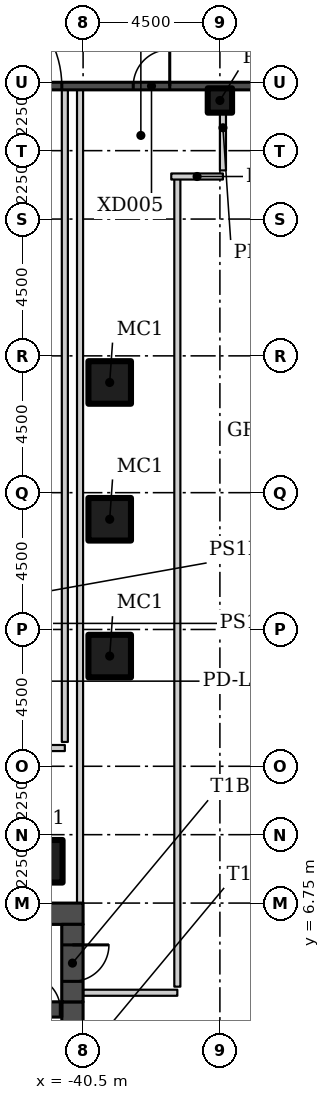
"""IFC4 building model, lengths in metres.
Left out: names, types, materials, properties, quantities, classifications, styles, units other than length and angle.
Written with IfcOpenShell. Run it as: python <this file> out.ifc"""

import sys

from ifc_helpers import new_model, si_unit, direction, frame, frame_2d, origin, origin_2d, place, context, subcontext, project, spatial, rectangle, hollow_rectangle, extrude, element, fill, save


model = new_model("IFC4")
c1 = context("Model", 3, precision=1e-05, world=origin(), true_north=direction((0.0, 1.0)))
c2 = subcontext(c1, "Body", "Model", "MODEL_VIEW")
j1 = project(units=[si_unit("LENGTHUNIT", "METRE"), si_unit("PLANEANGLEUNIT", "RADIAN")], contexts=[c1])
p1 = place(None, origin())
s1 = spatial("IfcSite", under=j1, at=p1, CompositionType="ELEMENT")
p2 = place(p1, origin())
s2 = spatial("IfcBuilding", under=s1, at=p2, CompositionType="ELEMENT")
p3 = place(p2, origin())
s3 = spatial("IfcBuildingStorey", under=s2, at=p3, CompositionType="ELEMENT", Elevation=0.0)
for number, where in (
    (1, (-41.875, 8.125, 0.0)),
    (2, (-39.625, 14.875, 0.0)),
    (3, (-39.625, 19.375, 0.0)),
    (4, (-39.625, 23.875, 0.0)),
):
    element("IfcColumn", number, at=place(p3, frame(where)), inside=s3, PredefinedType="COLUMN", context=c2, shape_type="SweptSolid", body=[
        extrude(hollow_rectangle(XDim=1.4, YDim=1.4, WallThickness=0.06, at=origin_2d()), origin(), (0.0, 0.0, 1.0), 6.1),
    ])
p4 = place(p3, frame((-36.0, 33.15, 0.0)))
e5 = element("IfcColumn", 5, at=p4, inside=s3, PredefinedType="COLUMN", context=c2, shape_type="SweptSolid", body=[
    extrude(hollow_rectangle(XDim=0.8, YDim=0.8, WallThickness=0.03, at=origin_2d()), origin(), (0.0, 0.0, 1.0), 6.1),
])
p5 = place(p3, frame((-37.4, 4.0, 0.0), z_axis=(0.0, 0.0, 1.0), x_axis=(0.0, 1.0, 0.0)))
e6 = element("IfcWall", 6, at=p5, inside=s3, PredefinedType="PARTITIONING", context=c2, shape_type="SweptSolid", body=[
    extrude(rectangle(XDim=26.649, YDim=0.2, at=frame_2d((13.325, 0.0))), origin(), (0.0, 0.0, 1.0), 6.1),
])
p6 = place(p3, frame((-35.9, 30.85, 0.0), z_axis=(0.0, 0.0, 1.0), x_axis=(0.0, 1.0, 0.0)))
e7 = element("IfcWall", 7, at=p6, inside=s3, PredefinedType="PARTITIONING", context=c2, shape_type="SweptSolid", body=[
    extrude(rectangle(XDim=2.805, YDim=0.2, at=frame_2d((1.402, 0.0))), origin(), (0.0, 0.0, 1.0), 6.1),
])
p7 = place(p3, frame((-40.6, 33.655, 0.0), z_axis=(0.0, 0.0, 1.0), x_axis=(0.0, -1.0, 0.0)))
e8 = element("IfcWall", 8, at=p7, inside=s3, PredefinedType="PARTITIONING", context=c2, shape_type="SweptSolid", body=[
    extrude(rectangle(XDim=26.905, YDim=0.2, at=frame_2d((13.453, 0.0))), origin(), (0.0, 0.0, 1.0), 6.1),
])
p8 = place(p3, frame((-37.6, 30.65, 0.0)))
e9 = element("IfcWall", 9, at=p8, inside=s3, PredefinedType="PARTITIONING", context=c2, shape_type="SweptSolid", body=[
    extrude(rectangle(XDim=1.7, YDim=0.2, at=frame_2d((0.85, 0.0))), origin(), (0.0, 0.0, 1.0), 6.1),
])
p9 = place(p3, frame((-40.5, 3.8, 0.0)))
e10 = element("IfcWall", 10, at=p9, inside=s3, PredefinedType="PARTITIONING", context=c2, shape_type="SweptSolid", body=[
    extrude(rectangle(XDim=3.1, YDim=0.2, at=frame_2d((1.55, 0.0))), origin(), (0.0, 0.0, 1.0), 6.1),
])
p10 = place(p3, frame((-44.6, 11.85, 0.0)))
e11 = element("IfcWall", 11, at=p10, inside=s3, PredefinedType="PARTITIONING", context=c2, shape_type="SweptSolid", body=[
    extrude(rectangle(XDim=3.5, YDim=0.2, at=frame_2d((1.75, 0.0))), origin(), (0.0, 0.0, 1.0), 6.1),
])
p11 = place(p3, frame((-41.1, 12.05, 0.0), z_axis=(0.0, 0.0, 1.0), x_axis=(0.0, 1.0, 0.0)))
e12 = element("IfcWall", 12, at=p11, inside=s3, PredefinedType="PARTITIONING", context=c2, shape_type="SweptSolid", body=[
    extrude(rectangle(XDim=21.605, YDim=0.2, at=frame_2d((10.802, 0.0))), origin(), (0.0, 0.0, 1.0), 6.1),
])
p12 = place(p3, frame((-67.5, 33.625, 0.0)))
e13 = element("IfcWall", 13, at=p12, inside=s3, PredefinedType="SOLIDWALL", context=c2, shape_type="SweptSolid", body=[
    extrude(rectangle(XDim=130.5, YDim=0.25, at=frame_2d((65.25, 0.0))), origin(), (0.0, 0.0, 1.0), 6.15),
])
p13 = place(p12, frame((28.65, 0.0, 0.0)))
e14 = element("IfcOpeningElement", 14, at=p13, cuts=e13, PredefinedType="OPENING", context=c2, shape_type="SweptSolid", body=[
    extrude(rectangle(XDim=1.2, YDim=2.4, at=frame_2d((0.6, 1.2))), frame((0.0, 0.135, 0.0), z_axis=(0.0, -1.0, 0.0), x_axis=(1.0, 0.0, 0.0)), (0.0, 0.0, 1.0), 0.27),
])
p14 = place(p12, frame((37.25, 0.0, 0.0)))
e15 = element("IfcOpeningElement", 15, at=p14, cuts=e13, PredefinedType="OPENING", context=c2, shape_type="SweptSolid", body=[
    extrude(rectangle(XDim=2.0, YDim=2.4, at=frame_2d((1.0, 1.2))), frame((0.0, 0.135, 0.0), z_axis=(0.0, -1.0, 0.0), x_axis=(1.0, 0.0, 0.0)), (0.0, 0.0, 1.0), 0.27),
])
p15 = place(p12, frame((100.25, 0.0, 0.0)))
e16 = element("IfcOpeningElement", 16, at=p15, cuts=e13, PredefinedType="OPENING", context=c2, shape_type="SweptSolid", body=[
    extrude(rectangle(XDim=2.0, YDim=2.4, at=frame_2d((1.0, 1.2))), frame((0.0, 0.135, 0.0), z_axis=(0.0, -1.0, 0.0), x_axis=(1.0, 0.0, 0.0)), (0.0, 0.0, 1.0), 0.27),
])
p16 = place(p12, frame((55.25, 0.0, 0.0)))
e17 = element("IfcOpeningElement", 17, at=p16, cuts=e13, PredefinedType="OPENING", context=c2, shape_type="SweptSolid", body=[
    extrude(rectangle(XDim=2.0, YDim=2.4, at=frame_2d((1.0, 1.2))), frame((0.0, 0.135, 0.0), z_axis=(0.0, -1.0, 0.0), x_axis=(1.0, 0.0, 0.0)), (0.0, 0.0, 1.0), 0.27),
])
p17 = place(p12, frame((68.75, 0.0, 0.0)))
e18 = element("IfcOpeningElement", 18, at=p17, cuts=e13, PredefinedType="OPENING", context=c2, shape_type="SweptSolid", body=[
    extrude(rectangle(XDim=2.0, YDim=2.4, at=frame_2d((1.0, 1.2))), frame((0.0, 0.135, 0.0), z_axis=(0.0, -1.0, 0.0), x_axis=(1.0, 0.0, 0.0)), (0.0, 0.0, 1.0), 0.27),
])
p18 = place(p12, frame((10.25, 0.0, 0.0)))
e19 = element("IfcOpeningElement", 19, at=p18, cuts=e13, PredefinedType="OPENING", context=c2, shape_type="SweptSolid", body=[
    extrude(rectangle(XDim=2.0, YDim=2.4, at=frame_2d((1.0, 1.2))), frame((0.0, 0.135, 0.0), z_axis=(0.0, -1.0, 0.0), x_axis=(1.0, 0.0, 0.0)), (0.0, 0.0, 1.0), 0.27),
])
p19 = place(p12, frame((5.65, 0.0, 0.0)))
e20 = element("IfcOpeningElement", 20, at=p19, cuts=e13, PredefinedType="OPENING", context=c2, shape_type="SweptSolid", body=[
    extrude(rectangle(XDim=2.2, YDim=2.4, at=frame_2d((1.1, 1.2))), frame((0.0, 0.135, 0.0), z_axis=(0.0, -1.0, 0.0), x_axis=(1.0, 0.0, 0.0)), (0.0, 0.0, 1.0), 0.27),
])
p20 = place(p12, frame((113.65, 0.0, 0.0)))
e21 = element("IfcOpeningElement", 21, at=p20, cuts=e13, PredefinedType="OPENING", context=c2, shape_type="SweptSolid", body=[
    extrude(rectangle(XDim=2.2, YDim=2.4, at=frame_2d((1.1, 1.2))), frame((0.0, 0.135, 0.0), z_axis=(0.0, -1.0, 0.0), x_axis=(1.0, 0.0, 0.0)), (0.0, 0.0, 1.0), 0.27),
])
p21 = place(p12, frame((45.45, 0.0, 0.0)))
e22 = element("IfcOpeningElement", 22, at=p21, cuts=e13, PredefinedType="OPENING", context=c2, shape_type="SweptSolid", body=[
    extrude(rectangle(XDim=3.6, YDim=4.5, at=frame_2d((1.8, 2.25))), frame((0.0, 0.135, 0.0), z_axis=(0.0, -1.0, 0.0), x_axis=(1.0, 0.0, 0.0)), (0.0, 0.0, 1.0), 0.27),
])
p22 = place(p12, frame((91.15, 0.0, 0.0)))
e23 = element("IfcOpeningElement", 23, at=p22, cuts=e13, PredefinedType="OPENING", context=c2, shape_type="SweptSolid", body=[
    extrude(rectangle(XDim=2.2, YDim=2.4, at=frame_2d((1.1, 1.2))), frame((0.0, 0.135, 0.0), z_axis=(0.0, -1.0, 0.0), x_axis=(1.0, 0.0, 0.0)), (0.0, 0.0, 1.0), 0.27),
])
p23 = place(p12, frame((23.0, 0.0, 0.0)))
e24 = element("IfcOpeningElement", 24, at=p23, cuts=e13, PredefinedType="OPENING", context=c2, shape_type="SweptSolid", body=[
    extrude(rectangle(XDim=3.3, YDim=2.4, at=frame_2d((1.65, 1.2))), frame((0.0, 0.135, 0.0), z_axis=(0.0, -1.0, 0.0), x_axis=(1.0, 0.0, 0.0)), (0.0, 0.0, 1.0), 0.27),
])
p24 = place(p12, frame((59.0, 0.0, 0.0)))
e25 = element("IfcOpeningElement", 25, at=p24, cuts=e13, PredefinedType="OPENING", context=c2, shape_type="SweptSolid", body=[
    extrude(rectangle(XDim=3.3, YDim=2.4, at=frame_2d((1.65, 1.2))), frame((0.0, 0.135, 0.0), z_axis=(0.0, -1.0, 0.0), x_axis=(1.0, 0.0, 0.0)), (0.0, 0.0, 1.0), 0.27),
])
p25 = place(p12, frame((86.0, 0.0, 0.0)))
e26 = element("IfcOpeningElement", 26, at=p25, cuts=e13, PredefinedType="OPENING", context=c2, shape_type="SweptSolid", body=[
    extrude(rectangle(XDim=3.3, YDim=2.4, at=frame_2d((1.65, 1.2))), frame((0.0, 0.135, 0.0), z_axis=(0.0, -1.0, 0.0), x_axis=(1.0, 0.0, 0.0)), (0.0, 0.0, 1.0), 0.27),
])
p26 = place(p12, frame((122.0, 0.0, 0.0)))
e27 = element("IfcOpeningElement", 27, at=p26, cuts=e13, PredefinedType="OPENING", context=c2, shape_type="SweptSolid", body=[
    extrude(rectangle(XDim=3.3, YDim=2.4, at=frame_2d((1.65, 1.2))), frame((0.0, 0.135, 0.0), z_axis=(0.0, -1.0, 0.0), x_axis=(1.0, 0.0, 0.0)), (0.0, 0.0, 1.0), 0.27),
])
p27 = place(p12, frame((127.05, 0.0, 3.0)))
e28 = element("IfcOpeningElement", 28, at=p27, cuts=e13, PredefinedType="OPENING", context=c2, shape_type="SweptSolid", body=[
    extrude(rectangle(XDim=2.4, YDim=1.2, at=frame_2d((1.2, 0.6))), frame((0.0, 0.135, 0.0), z_axis=(0.0, -1.0, 0.0), x_axis=(1.0, 0.0, 0.0)), (0.0, 0.0, 1.0), 0.27),
])
p28 = place(p12, frame((118.05, 0.0, 3.0)))
e29 = element("IfcOpeningElement", 29, at=p28, cuts=e13, PredefinedType="OPENING", context=c2, shape_type="SweptSolid", body=[
    extrude(rectangle(XDim=2.4, YDim=1.2, at=frame_2d((1.2, 0.6))), frame((0.0, 0.135, 0.0), z_axis=(0.0, -1.0, 0.0), x_axis=(1.0, 0.0, 0.0)), (0.0, 0.0, 1.0), 0.27),
])
p29 = place(p12, frame((109.05, 0.0, 3.0)))
e30 = element("IfcOpeningElement", 30, at=p29, cuts=e13, PredefinedType="OPENING", context=c2, shape_type="SweptSolid", body=[
    extrude(rectangle(XDim=2.4, YDim=1.2, at=frame_2d((1.2, 0.6))), frame((0.0, 0.135, 0.0), z_axis=(0.0, -1.0, 0.0), x_axis=(1.0, 0.0, 0.0)), (0.0, 0.0, 1.0), 0.27),
])
p30 = place(p12, frame((104.55, 0.0, 3.0)))
e31 = element("IfcOpeningElement", 31, at=p30, cuts=e13, PredefinedType="OPENING", context=c2, shape_type="SweptSolid", body=[
    extrude(rectangle(XDim=2.4, YDim=1.2, at=frame_2d((1.2, 0.6))), frame((0.0, 0.135, 0.0), z_axis=(0.0, -1.0, 0.0), x_axis=(1.0, 0.0, 0.0)), (0.0, 0.0, 1.0), 0.27),
])
p31 = place(p12, frame((95.55, 0.0, 3.0)))
e32 = element("IfcOpeningElement", 32, at=p31, cuts=e13, PredefinedType="OPENING", context=c2, shape_type="SweptSolid", body=[
    extrude(rectangle(XDim=2.4, YDim=1.2, at=frame_2d((1.2, 0.6))), frame((0.0, 0.135, 0.0), z_axis=(0.0, -1.0, 0.0), x_axis=(1.0, 0.0, 0.0)), (0.0, 0.0, 1.0), 0.27),
])
p32 = place(p12, frame((82.05, 0.0, 3.0)))
e33 = element("IfcOpeningElement", 33, at=p32, cuts=e13, PredefinedType="OPENING", context=c2, shape_type="SweptSolid", body=[
    extrude(rectangle(XDim=2.4, YDim=1.2, at=frame_2d((1.2, 0.6))), frame((0.0, 0.135, 0.0), z_axis=(0.0, -1.0, 0.0), x_axis=(1.0, 0.0, 0.0)), (0.0, 0.0, 1.0), 0.27),
])
p33 = place(p12, frame((77.55, 0.0, 3.0)))
e34 = element("IfcOpeningElement", 34, at=p33, cuts=e13, PredefinedType="OPENING", context=c2, shape_type="SweptSolid", body=[
    extrude(rectangle(XDim=2.4, YDim=1.2, at=frame_2d((1.2, 0.6))), frame((0.0, 0.135, 0.0), z_axis=(0.0, -1.0, 0.0), x_axis=(1.0, 0.0, 0.0)), (0.0, 0.0, 1.0), 0.27),
])
p34 = place(p12, frame((73.05, 0.0, 3.0)))
e35 = element("IfcOpeningElement", 35, at=p34, cuts=e13, PredefinedType="OPENING", context=c2, shape_type="SweptSolid", body=[
    extrude(rectangle(XDim=2.4, YDim=1.2, at=frame_2d((1.2, 0.6))), frame((0.0, 0.135, 0.0), z_axis=(0.0, -1.0, 0.0), x_axis=(1.0, 0.0, 0.0)), (0.0, 0.0, 1.0), 0.27),
])
p35 = place(p12, frame((64.05, 0.0, 3.0)))
e36 = element("IfcOpeningElement", 36, at=p35, cuts=e13, PredefinedType="OPENING", context=c2, shape_type="SweptSolid", body=[
    extrude(rectangle(XDim=2.4, YDim=1.2, at=frame_2d((1.2, 0.6))), frame((0.0, 0.135, 0.0), z_axis=(0.0, -1.0, 0.0), x_axis=(1.0, 0.0, 0.0)), (0.0, 0.0, 1.0), 0.27),
])
p36 = place(p12, frame((50.55, 0.0, 3.0)))
e37 = element("IfcOpeningElement", 37, at=p36, cuts=e13, PredefinedType="OPENING", context=c2, shape_type="SweptSolid", body=[
    extrude(rectangle(XDim=2.4, YDim=1.2, at=frame_2d((1.2, 0.6))), frame((0.0, 0.135, 0.0), z_axis=(0.0, -1.0, 0.0), x_axis=(1.0, 0.0, 0.0)), (0.0, 0.0, 1.0), 0.27),
])
p37 = place(p12, frame((41.55, 0.0, 3.0)))
e38 = element("IfcOpeningElement", 38, at=p37, cuts=e13, PredefinedType="OPENING", context=c2, shape_type="SweptSolid", body=[
    extrude(rectangle(XDim=2.4, YDim=1.2, at=frame_2d((1.2, 0.6))), frame((0.0, 0.135, 0.0), z_axis=(0.0, -1.0, 0.0), x_axis=(1.0, 0.0, 0.0)), (0.0, 0.0, 1.0), 0.27),
])
p38 = place(p12, frame((32.55, 0.0, 3.0)))
e39 = element("IfcOpeningElement", 39, at=p38, cuts=e13, PredefinedType="OPENING", context=c2, shape_type="SweptSolid", body=[
    extrude(rectangle(XDim=2.4, YDim=1.2, at=frame_2d((1.2, 0.6))), frame((0.0, 0.135, 0.0), z_axis=(0.0, -1.0, 0.0), x_axis=(1.0, 0.0, 0.0)), (0.0, 0.0, 1.0), 0.27),
])
p39 = place(p12, frame((19.05, 0.0, 3.0)))
e40 = element("IfcOpeningElement", 40, at=p39, cuts=e13, PredefinedType="OPENING", context=c2, shape_type="SweptSolid", body=[
    extrude(rectangle(XDim=2.4, YDim=1.2, at=frame_2d((1.2, 0.6))), frame((0.0, 0.135, 0.0), z_axis=(0.0, -1.0, 0.0), x_axis=(1.0, 0.0, 0.0)), (0.0, 0.0, 1.0), 0.27),
])
p40 = place(p12, frame((14.55, 0.0, 3.0)))
e41 = element("IfcOpeningElement", 41, at=p40, cuts=e13, PredefinedType="OPENING", context=c2, shape_type="SweptSolid", body=[
    extrude(rectangle(XDim=2.4, YDim=1.2, at=frame_2d((1.2, 0.6))), frame((0.0, 0.135, 0.0), z_axis=(0.0, -1.0, 0.0), x_axis=(1.0, 0.0, 0.0)), (0.0, 0.0, 1.0), 0.27),
])
p41 = place(p12, frame((1.05, 0.0, 3.0)))
e42 = element("IfcOpeningElement", 42, at=p41, cuts=e13, PredefinedType="OPENING", context=c2, shape_type="SweptSolid", body=[
    extrude(rectangle(XDim=2.4, YDim=1.2, at=frame_2d((1.2, 0.6))), frame((0.0, 0.135, 0.0), z_axis=(0.0, -1.0, 0.0), x_axis=(1.0, 0.0, 0.0)), (0.0, 0.0, 1.0), 0.27),
])
p42 = place(p3, frame((-40.5, 6.4, 0.0), z_axis=(0.0, 0.0, 1.0), x_axis=(-1.0, 0.0, 0.0)))
e43 = element("IfcWall", 43, at=p42, inside=s3, PredefinedType="SHEAR", context=c2, shape_type="SweptSolid", body=[
    extrude(rectangle(XDim=13.5, YDim=0.7, at=frame_2d((6.75, 0.0))), origin(), (0.0, 0.0, 1.0), 6.1),
])
p43 = place(p3, frame((-40.85, -3.5, 0.0), z_axis=(0.0, 0.0, 1.0), x_axis=(0.0, 1.0, 0.0)))
e44 = element("IfcWall", 44, at=p43, inside=s3, PredefinedType="SHEAR", context=c2, shape_type="SweptSolid", body=[
    extrude(rectangle(XDim=7.0, YDim=0.7, at=frame_2d((3.5, 0.0))), origin(), (0.0, 0.0, 1.0), 6.1),
])
p44 = place(p43, frame((0.9, 0.0, 0.0)))
e45 = element("IfcOpeningElement", 45, at=p44, cuts=e44, PredefinedType="OPENING", context=c2, shape_type="SweptSolid", body=[
    extrude(rectangle(XDim=1.2, YDim=2.1, at=frame_2d((0.6, 1.05))), frame((0.0, 0.36, 0.0), z_axis=(0.0, -1.0, 0.0), x_axis=(1.0, 0.0, 0.0)), (0.0, 0.0, 1.0), 0.72),
])
p45 = place(p43, frame((3.85, 0.0, 0.0)))
e46 = element("IfcOpeningElement", 46, at=p45, cuts=e44, PredefinedType="OPENING", context=c2, shape_type="SweptSolid", body=[
    extrude(rectangle(XDim=1.8, YDim=2.4, at=frame_2d((0.9, 1.2))), frame((0.0, 0.36, 0.0), z_axis=(0.0, -1.0, 0.0), x_axis=(1.0, 0.0, 0.0)), (0.0, 0.0, 1.0), 0.72),
])
p46 = place(p3, frame((-40.85, 6.05, 0.0), z_axis=(0.0, 0.0, 1.0), x_axis=(0.0, -1.0, 0.0)))
e47 = element("IfcWall", 47, at=p46, inside=s3, PredefinedType="SHEAR", context=c2, shape_type="SweptSolid", body=[
    extrude(rectangle(XDim=2.55, YDim=0.7, at=frame_2d((1.275, 0.0))), origin(), (0.0, 0.0, 1.0), 6.1),
])
p47 = place(p46, frame((0.675, 0.0, 0.0)))
e48 = element("IfcOpeningElement", 48, at=p47, cuts=e47, PredefinedType="OPENING", context=c2, shape_type="SweptSolid", body=[
    extrude(rectangle(XDim=1.2, YDim=2.4, at=frame_2d((0.6, 1.2))), frame((0.0, 0.36, 0.0), z_axis=(0.0, -1.0, 0.0), x_axis=(1.0, 0.0, 0.0)), (0.0, 0.0, 1.0), 0.72),
])
p48 = place(p3, frame((-48.5, 3.25, 0.0)))
e49 = element("IfcWall", 49, at=p48, inside=s3, PredefinedType="SHEAR", context=c2, shape_type="SweptSolid", body=[
    extrude(rectangle(XDim=7.3, YDim=0.5, at=frame_2d((3.65, 0.0))), origin(), (0.0, 0.0, 1.0), 6.1),
])
p49 = place(p48, frame((6.15, 0.0, 0.0)))
e50 = element("IfcOpeningElement", 50, at=p49, cuts=e49, PredefinedType="OPENING", context=c2, shape_type="SweptSolid", body=[
    extrude(rectangle(XDim=1.1, YDim=2.1, at=frame_2d((0.55, 1.05))), frame((0.0, 0.26, 0.0), z_axis=(0.0, -1.0, 0.0), x_axis=(1.0, 0.0, 0.0)), (0.0, 0.0, 1.0), 0.52),
])
p50 = place(p13, origin())
e51 = element("IfcDoor", 51, at=p50, inside=s3, OperationType="SINGLE_SWING_RIGHT", PredefinedType="DOOR", context=c2, shape_type="SweptSolid", body=[
    extrude(rectangle(XDim=1.2, YDim=2.4, at=frame_2d((0.6, 1.2))), frame((0.0, 0.025, 0.0), z_axis=(0.0, -1.0, 0.0), x_axis=(1.0, 0.0, 0.0)), (0.0, 0.0, 1.0), 0.05),
])
fill(e14, e51)
p51 = place(p23, origin())
e52 = element("IfcDoor", 52, at=p51, inside=s3, OperationType="DOUBLE_DOOR_SINGLE_SWING", PredefinedType="DOOR", context=c2, shape_type="SweptSolid", body=[
    extrude(rectangle(XDim=3.3, YDim=2.4, at=frame_2d((1.65, 1.2))), frame((0.0, 0.025, 0.0), z_axis=(0.0, -1.0, 0.0), x_axis=(1.0, 0.0, 0.0)), (0.0, 0.0, 1.0), 0.05),
])
fill(e24, e52)
p52 = place(p47, origin())
e53 = element("IfcDoor", 53, at=p52, inside=s3, OperationType="SINGLE_SWING_LEFT", PredefinedType="DOOR", context=c2, shape_type="SweptSolid", body=[
    extrude(rectangle(XDim=1.2, YDim=2.4, at=frame_2d((0.6, 1.2))), frame((0.0, 0.025, 0.0), z_axis=(0.0, -1.0, 0.0), x_axis=(1.0, 0.0, 0.0)), (0.0, 0.0, 1.0), 0.05),
])
fill(e48, e53)
p53 = place(p49, origin())
e54 = element("IfcDoor", 54, at=p53, inside=s3, OperationType="SINGLE_SWING_RIGHT", PredefinedType="DOOR", context=c2, shape_type="SweptSolid", body=[
    extrude(rectangle(XDim=1.1, YDim=2.1, at=frame_2d((0.55, 1.05))), frame((0.0, 0.025, 0.0), z_axis=(0.0, -1.0, 0.0), x_axis=(1.0, 0.0, 0.0)), (0.0, 0.0, 1.0), 0.05),
])
fill(e50, e54)
save(model, sys.argv[1])
